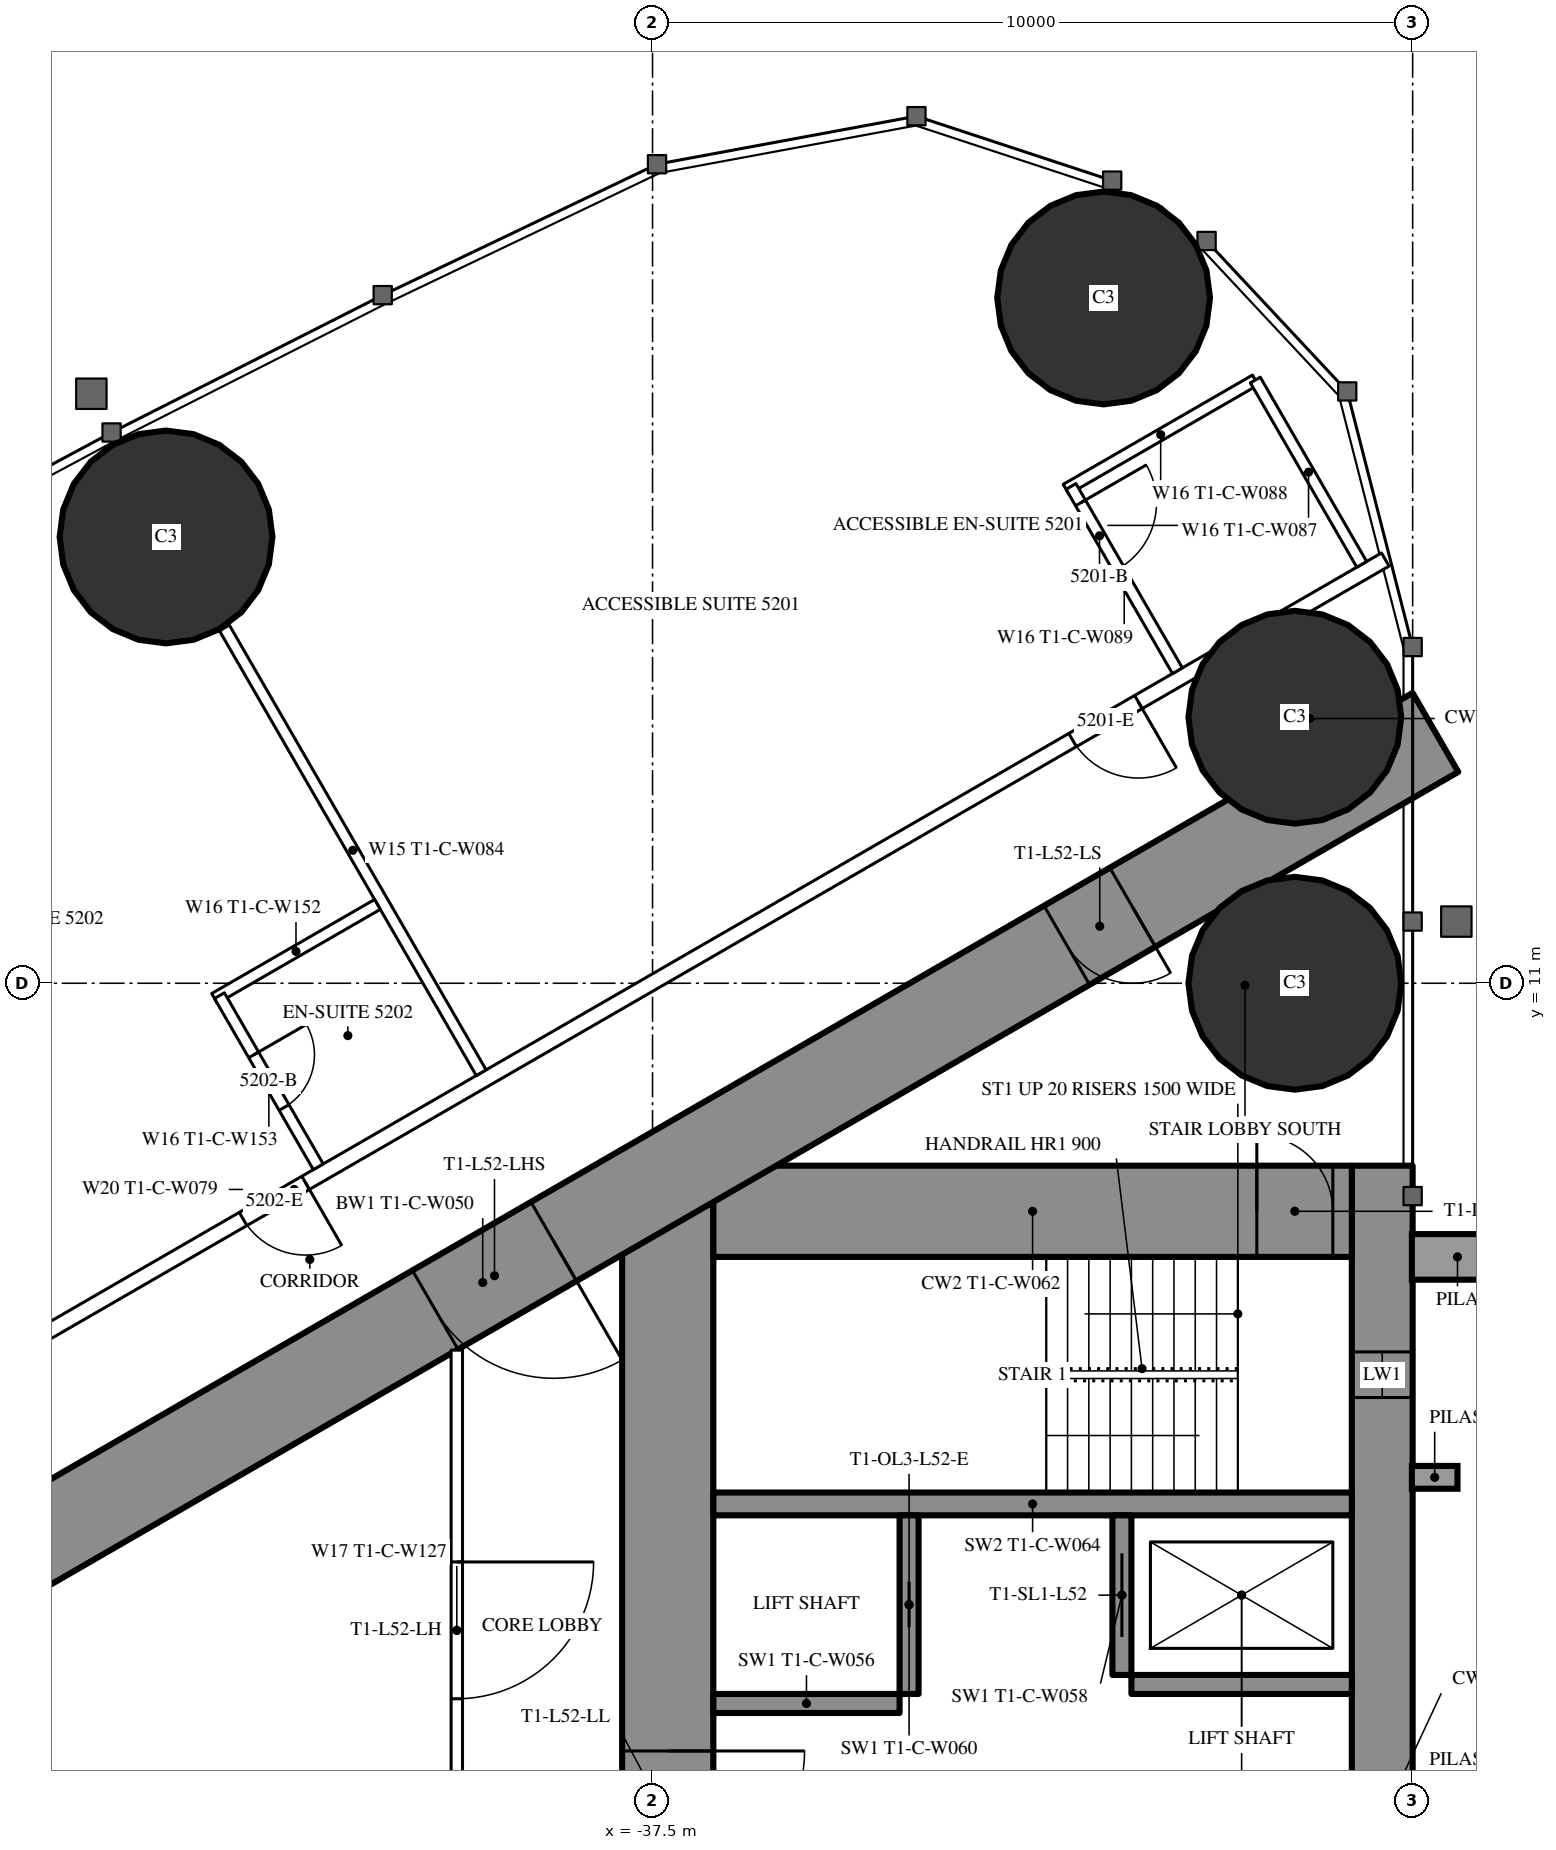
"""IFC4 building model, lengths in metres.
Left out: names, types, materials, properties, quantities, classifications, styles, units other than length and angle.
Written with IfcOpenShell. Run it as: python <this file> out.ifc"""

import sys

from ifc_helpers import new_model, si_unit, direction, frame, frame_2d, origin, origin_2d, place, context, subcontext, project, spatial, rectangle, circle, extrude, element, fill, save


model = new_model("IFC4")
c1 = context("Model", 3, precision=1e-05, world=origin(), true_north=direction((0.0, 1.0)))
c2 = subcontext(c1, "Body", "Model", "MODEL_VIEW")
j1 = project(units=[si_unit("LENGTHUNIT", "METRE"), si_unit("PLANEANGLEUNIT", "RADIAN")], contexts=[c1])
p1 = place(None, origin())
s1 = spatial("IfcSite", under=j1, at=p1, CompositionType="ELEMENT")
p2 = place(p1, origin())
s2 = spatial("IfcBuilding", under=s1, at=p2, CompositionType="ELEMENT")
p3 = place(p2, frame((0.0, 0.0, 194.8)))
s3 = spatial("IfcBuildingStorey", under=s2, at=p3, CompositionType="ELEMENT", Elevation=194.8)
for number, where, z_axis, x_axis in (
    (1, (-31.565, 20.016, 0.0), (0.0, 0.0, 1.0), (1.0, 0.0, 0.0)),
    (2, (-29.05, 11.0, 0.0), (0.0, 0.0, 1.0), (1.0, 0.0, 0.0)),
    (3, (-29.05, 14.5, 0.0), (0.0, 0.0, 1.0), (1.0, 0.0, 0.0)),
    (4, (-43.9, 16.871, 0.0), (0.0, 0.0, 1.0), (1.0, 0.0, 0.0)),
):
    element("IfcColumn", number, at=place(p3, frame(where, z_axis=z_axis, x_axis=x_axis)), inside=s3, PredefinedType="COLUMN", context=c2, shape_type="SweptSolid", body=[
        extrude(circle(Radius=1.4, at=origin_2d()), origin(), (0.0, 0.0, 1.0), 3.5),
    ])
p4 = place(p3, frame((-27.9, 8.6, 0.0), z_axis=(0.0, 0.0, 1.0), x_axis=(0.0, -1.0, 0.0)))
e5 = element("IfcWall", 5, at=p4, inside=s3, PredefinedType="SHEAR", context=c2, shape_type="SweptSolid", body=[
    extrude(rectangle(XDim=17.2, YDim=0.8, at=frame_2d((8.6, 0.0))), origin(), (0.0, 0.0, 1.0), 3.5),
])
p5 = place(p4, frame((2.45, 0.0, 0.6)))
e6 = element("IfcOpeningElement", 6, at=p5, cuts=e5, PredefinedType="OPENING", context=c2, shape_type="SweptSolid", body=[
    extrude(rectangle(XDim=0.6, YDim=2.1, at=frame_2d((0.3, 1.05))), frame((0.0, 0.41, 0.0), z_axis=(0.0, -1.0, 0.0), x_axis=(1.0, 0.0, 0.0)), (0.0, 0.0, 1.0), 0.82),
])
p6 = place(p4, frame((14.15, 0.0, 0.6)))
e7 = element("IfcOpeningElement", 7, at=p6, cuts=e5, PredefinedType="OPENING", context=c2, shape_type="SweptSolid", body=[
    extrude(rectangle(XDim=0.6, YDim=2.1, at=frame_2d((0.3, 1.05))), frame((0.0, 0.41, 0.0), z_axis=(0.0, -1.0, 0.0), x_axis=(1.0, 0.0, 0.0)), (0.0, 0.0, 1.0), 0.82),
])
p7 = place(p3, frame((-37.3, 8.6, 0.0), z_axis=(0.0, 0.0, 1.0), x_axis=(0.0, -1.0, 0.0)))
e8 = element("IfcWall", 8, at=p7, inside=s3, PredefinedType="SHEAR", context=c2, shape_type="SweptSolid", body=[
    extrude(rectangle(XDim=17.2, YDim=1.2, at=frame_2d((8.6, 0.0))), origin(), (0.0, 0.0, 1.0), 3.5),
])
p8 = place(p7, frame((7.7, 0.0, 0.0)))
e9 = element("IfcOpeningElement", 9, at=p8, cuts=e8, PredefinedType="OPENING", context=c2, shape_type="SweptSolid", body=[
    extrude(rectangle(XDim=1.8, YDim=2.2, at=frame_2d((0.9, 1.1))), frame((0.0, 0.61, 0.0), z_axis=(0.0, -1.0, 0.0), x_axis=(1.0, 0.0, 0.0)), (0.0, 0.0, 1.0), 1.22),
])
p9 = place(p3, frame((-28.3, 8.0, 0.0), z_axis=(0.0, 0.0, 1.0), x_axis=(-1.0, 0.0, 0.0)))
e10 = element("IfcWall", 10, at=p9, inside=s3, PredefinedType="SHEAR", context=c2, shape_type="SweptSolid", body=[
    extrude(rectangle(XDim=8.4, YDim=1.2, at=frame_2d((4.2, 0.0))), origin(), (0.0, 0.0, 1.0), 3.5),
])
p10 = place(p9, frame((0.25, 0.0, 0.0)))
e11 = element("IfcOpeningElement", 11, at=p10, cuts=e10, PredefinedType="OPENING", context=c2, shape_type="SweptSolid", body=[
    extrude(rectangle(XDim=1.0, YDim=2.2, at=frame_2d((0.5, 1.1))), frame((0.0, 0.61, 0.0), z_axis=(0.0, -1.0, 0.0), x_axis=(1.0, 0.0, 0.0)), (0.0, 0.0, 1.0), 1.22),
])
p11 = place(p3, frame((-28.3, 4.15, 0.0), z_axis=(0.0, 0.0, 1.0), x_axis=(-1.0, 0.0, 0.0)))
e12 = element("IfcWall", 12, at=p11, inside=s3, PredefinedType="SHEAR", context=c2, shape_type="SweptSolid", body=[
    extrude(rectangle(XDim=8.4, YDim=0.3, at=frame_2d((4.2, 0.0))), origin(), (0.0, 0.0, 1.0), 3.5),
])
p12 = place(p3, frame((-31.325, 4.0, 0.0), z_axis=(0.0, 0.0, 1.0), x_axis=(0.0, -1.0, 0.0)))
e13 = element("IfcWall", 13, at=p12, inside=s3, PredefinedType="SHEAR", context=c2, shape_type="SweptSolid", body=[
    extrude(rectangle(XDim=2.1, YDim=0.25, at=frame_2d((1.05, 0.0))), origin(), (0.0, 0.0, 1.0), 3.5),
])
p13 = place(p12, frame((0.5, 0.0, 0.0)))
e14 = element("IfcOpeningElement", 14, at=p13, cuts=e13, PredefinedType="OPENING", context=c2, shape_type="SweptSolid", body=[
    extrude(rectangle(XDim=1.1, YDim=2.2, at=frame_2d((0.55, 1.1))), frame((0.0, 0.135, 0.0), z_axis=(0.0, -1.0, 0.0), x_axis=(1.0, 0.0, 0.0)), (0.0, 0.0, 1.0), 0.27),
])
p14 = place(p3, frame((-34.125, 4.0, 0.0), z_axis=(0.0, 0.0, 1.0), x_axis=(0.0, -1.0, 0.0)))
e15 = element("IfcWall", 15, at=p14, inside=s3, PredefinedType="SHEAR", context=c2, shape_type="SweptSolid", body=[
    extrude(rectangle(XDim=2.35, YDim=0.25, at=frame_2d((1.175, 0.0))), origin(), (0.0, 0.0, 1.0), 3.5),
])
p15 = place(p14, frame((0.875, 0.0, 0.0)))
e16 = element("IfcOpeningElement", 16, at=p15, cuts=e15, PredefinedType="OPENING", context=c2, shape_type="SweptSolid", body=[
    extrude(rectangle(XDim=0.6, YDim=2.0, at=frame_2d((0.3, 1.0))), frame((0.0, 0.135, 0.0), z_axis=(0.0, -1.0, 0.0), x_axis=(1.0, 0.0, 0.0)), (0.0, 0.0, 1.0), 0.27),
])
p16 = place(p3, frame((-28.3, 1.775, 0.0), z_axis=(0.0, 0.0, 1.0), x_axis=(-1.0, 0.0, 0.0)))
e17 = element("IfcWall", 17, at=p16, inside=s3, PredefinedType="SHEAR", context=c2, shape_type="SweptSolid", body=[
    extrude(rectangle(XDim=2.9, YDim=0.25, at=frame_2d((1.45, 0.0))), origin(), (0.0, 0.0, 1.0), 3.5),
])
p17 = place(p3, frame((-34.25, 1.525, 0.0), z_axis=(0.0, 0.0, 1.0), x_axis=(-1.0, 0.0, 0.0)))
e18 = element("IfcWall", 18, at=p17, inside=s3, PredefinedType="SHEAR", context=c2, shape_type="SweptSolid", body=[
    extrude(rectangle(XDim=2.45, YDim=0.25, at=frame_2d((1.225, 0.0))), origin(), (0.0, 0.0, 1.0), 3.5),
])
p18 = place(p3, frame((-27.2, 14.3, 0.0), z_axis=(0.0, 0.0, 1.0), x_axis=(-0.866026593062, -0.499997940104, 0.0)))
e19 = element("IfcWall", 19, at=p18, inside=s3, PredefinedType="SHEAR", context=c2, shape_type="SweptSolid", body=[
    extrude(rectangle(XDim=28.946, YDim=1.2, at=frame_2d((14.473, 0.0))), origin(), (0.0, 0.0, 1.0), 3.5),
])
p19 = place(p18, frame((4.6, 0.0, 0.0)))
e20 = element("IfcOpeningElement", 20, at=p19, cuts=e19, PredefinedType="OPENING", context=c2, shape_type="SweptSolid", body=[
    extrude(rectangle(XDim=1.0, YDim=2.2, at=frame_2d((0.5, 1.1))), frame((0.0, 0.61, 0.0), z_axis=(0.0, -1.0, 0.0), x_axis=(1.0, 0.0, 0.0)), (0.0, 0.0, 1.0), 1.22),
])
p20 = place(p18, frame((13.395, 0.0, 0.0)))
e21 = element("IfcOpeningElement", 21, at=p20, cuts=e19, PredefinedType="OPENING", context=c2, shape_type="SweptSolid", body=[
    extrude(rectangle(XDim=1.8, YDim=2.2, at=frame_2d((0.9, 1.1))), frame((0.0, 0.61, 0.0), z_axis=(0.0, -1.0, 0.0), x_axis=(1.0, 0.0, 0.0)), (0.0, 0.0, 1.0), 1.22),
])
p21 = place(p3, frame((-27.86, 16.575, 0.0), z_axis=(0.0, 0.0, 1.0), x_axis=(-0.866025533911, -0.499999774615, 0.0)))
e22 = element("IfcWall", 22, at=p21, inside=s3, PredefinedType="PARTITIONING", context=c2, shape_type="SweptSolid", body=[
    extrude(rectangle(XDim=33.149, YDim=0.2, at=frame_2d((16.575, 0.0))), origin(), (0.0, 0.0, 1.0), 3.25),
])
p22 = place(p21, frame((3.75, 0.0, 0.0)))
e23 = element("IfcOpeningElement", 23, at=p22, cuts=e22, PredefinedType="OPENING", context=c2, shape_type="SweptSolid", body=[
    extrude(rectangle(XDim=1.0, YDim=2.2, at=frame_2d((0.5, 1.1))), frame((0.0, 0.11, 0.0), z_axis=(0.0, -1.0, 0.0), x_axis=(1.0, 0.0, 0.0)), (0.0, 0.0, 1.0), 0.22),
])
p23 = place(p21, frame((16.402, 0.0, 0.0)))
e24 = element("IfcOpeningElement", 24, at=p23, cuts=e22, PredefinedType="OPENING", context=c2, shape_type="SweptSolid", body=[
    extrude(rectangle(XDim=0.95, YDim=2.2, at=frame_2d((0.475, 1.1))), frame((0.0, 0.11, 0.0), z_axis=(0.0, -1.0, 0.0), x_axis=(1.0, 0.0, 0.0)), (0.0, 0.0, 1.0), 0.22),
])
p24 = place(p21, frame((22.047, 0.0, 0.0)))
e25 = element("IfcOpeningElement", 25, at=p24, cuts=e22, PredefinedType="OPENING", context=c2, shape_type="SweptSolid", body=[
    extrude(rectangle(XDim=0.95, YDim=2.2, at=frame_2d((0.475, 1.1))), frame((0.0, 0.11, 0.0), z_axis=(0.0, -1.0, 0.0), x_axis=(1.0, 0.0, 0.0)), (0.0, 0.0, 1.0), 0.22),
])
p25 = place(p21, frame((30.396, 0.0, 0.0)))
e26 = element("IfcOpeningElement", 26, at=p25, cuts=e22, PredefinedType="OPENING", context=c2, shape_type="SweptSolid", body=[
    extrude(rectangle(XDim=1.8, YDim=2.2, at=frame_2d((0.9, 1.1))), frame((0.0, 0.11, 0.0), z_axis=(0.0, -1.0, 0.0), x_axis=(1.0, 0.0, 0.0)), (0.0, 0.0, 1.0), 0.22),
])
p26 = place(p3, frame((-39.754, 9.823, 0.0), z_axis=(0.0, 0.0, 1.0), x_axis=(-0.499997670926, 0.866026748472, 0.0)))
e27 = element("IfcWall", 27, at=p26, inside=s3, PredefinedType="PARTITIONING", context=c2, shape_type="SweptSolid", body=[
    extrude(rectangle(XDim=6.757, YDim=0.15, at=frame_2d((3.379, 0.0))), origin(), (0.0, 0.0, 1.0), 2.3),
])
p27 = place(p3, frame((-29.57, 18.936, 0.0), z_axis=(0.0, 0.0, 1.0), x_axis=(-0.866018712932, -0.500011588718, 0.0)))
e28 = element("IfcWall", 28, at=p27, inside=s3, PredefinedType="PARTITIONING", context=c2, shape_type="SweptSolid", body=[
    extrude(rectangle(XDim=2.875, YDim=0.15, at=frame_2d((1.438, 0.0))), origin(), (0.0, 0.0, 1.0), 3.25),
])
p28 = place(p3, frame((-30.595, 15.111, 0.0), z_axis=(0.0, 0.0, 1.0), x_axis=(-0.49998411664, 0.866034573852, 0.0)))
e29 = element("IfcWall", 29, at=p28, inside=s3, PredefinedType="PARTITIONING", context=c2, shape_type="SweptSolid", body=[
    extrude(rectangle(XDim=2.8, YDim=0.15, at=frame_2d((1.4, 0.0))), origin(), (0.0, 0.0, 1.0), 3.25),
])
p29 = place(p28, frame((1.55, 0.0, 0.0)))
e30 = element("IfcOpeningElement", 30, at=p29, cuts=e29, PredefinedType="OPENING", context=c2, shape_type="SweptSolid", body=[
    extrude(rectangle(XDim=1.0, YDim=2.2, at=frame_2d((0.5, 1.1))), frame((0.0, 0.085, 0.0), z_axis=(0.0, -1.0, 0.0), x_axis=(1.0, 0.0, 0.0)), (0.0, 0.0, 1.0), 0.17),
])
p30 = place(p3, frame((-28.17, 16.511, 0.0), z_axis=(0.0, 0.0, 1.0), x_axis=(-0.49994636267, 0.866056369097, 0.0)))
e31 = element("IfcWall", 31, at=p30, inside=s3, PredefinedType="PARTITIONING", context=c2, shape_type="SweptSolid", body=[
    extrude(rectangle(XDim=2.8, YDim=0.15, at=frame_2d((1.4, 0.0))), origin(), (0.0, 0.0, 1.0), 3.25),
])
p31 = place(p3, frame((-41.119, 12.037, 0.0), z_axis=(0.0, 0.0, 1.0), x_axis=(-0.866073894602, -0.499916002032, 0.0)))
e32 = element("IfcWall", 32, at=p31, inside=s3, PredefinedType="PARTITIONING", context=c2, shape_type="SweptSolid", body=[
    extrude(rectangle(XDim=2.475, YDim=0.15, at=frame_2d((1.238, 0.0))), origin(), (0.0, 0.0, 1.0), 3.25),
])
p32 = place(p3, frame((-41.898, 8.585, 0.0), z_axis=(0.0, 0.0, 1.0), x_axis=(-0.500006934395, 0.866021400173, 0.0)))
e33 = element("IfcWall", 33, at=p32, inside=s3, PredefinedType="PARTITIONING", context=c2, shape_type="SweptSolid", body=[
    extrude(rectangle(XDim=2.6, YDim=0.15, at=frame_2d((1.3, 0.0))), origin(), (0.0, 0.0, 1.0), 3.25),
])
p33 = place(p32, frame((0.9, 0.0, 0.0)))
e34 = element("IfcOpeningElement", 34, at=p33, cuts=e33, PredefinedType="OPENING", context=c2, shape_type="SweptSolid", body=[
    extrude(rectangle(XDim=0.8, YDim=2.2, at=frame_2d((0.4, 1.1))), frame((0.0, 0.085, 0.0), z_axis=(0.0, -1.0, 0.0), x_axis=(1.0, 0.0, 0.0)), (0.0, 0.0, 1.0), 0.17),
])
p34 = place(p3, frame((-40.075, 6.174, 0.0), z_axis=(0.0, 0.0, 1.0), x_axis=(0.0, -1.0, 0.0)))
e35 = element("IfcWall", 35, at=p34, inside=s3, PredefinedType="PARTITIONING", context=c2, shape_type="SweptSolid", body=[
    extrude(rectangle(XDim=7.374, YDim=0.15, at=frame_2d((3.687, 0.0))), origin(), (0.0, 0.0, 1.0), 3.25),
])
p35 = place(p34, frame((2.787, 0.0, 0.0)))
e36 = element("IfcOpeningElement", 36, at=p35, cuts=e35, PredefinedType="OPENING", context=c2, shape_type="SweptSolid", body=[
    extrude(rectangle(XDim=1.8, YDim=2.2, at=frame_2d((0.9, 1.1))), frame((0.0, 0.085, 0.0), z_axis=(0.0, -1.0, 0.0), x_axis=(1.0, 0.0, 0.0)), (0.0, 0.0, 1.0), 0.17),
])
p36 = place(p29, origin())
e37 = element("IfcDoor", 37, at=p36, inside=s3, OperationType="SINGLE_SWING_RIGHT", PredefinedType="DOOR", context=c2, shape_type="SweptSolid", body=[
    extrude(rectangle(XDim=1.0, YDim=2.2, at=frame_2d((0.5, 1.1))), frame((0.0, 0.025, 0.0), z_axis=(0.0, -1.0, 0.0), x_axis=(1.0, 0.0, 0.0)), (0.0, 0.0, 1.0), 0.05),
])
fill(e30, e37)
p37 = place(p22, origin())
e38 = element("IfcDoor", 38, at=p37, inside=s3, OperationType="SINGLE_SWING_LEFT", PredefinedType="DOOR", context=c2, shape_type="SweptSolid", body=[
    extrude(rectangle(XDim=1.0, YDim=2.2, at=frame_2d((0.5, 1.1))), frame((0.0, 0.025, 0.0), z_axis=(0.0, -1.0, 0.0), x_axis=(1.0, 0.0, 0.0)), (0.0, 0.0, 1.0), 0.05),
])
fill(e23, e38)
p38 = place(p33, origin())
e39 = element("IfcDoor", 39, at=p38, inside=s3, OperationType="SINGLE_SWING_RIGHT", PredefinedType="DOOR", context=c2, shape_type="SweptSolid", body=[
    extrude(rectangle(XDim=0.8, YDim=2.2, at=frame_2d((0.4, 1.1))), frame((0.0, 0.025, 0.0), z_axis=(0.0, -1.0, 0.0), x_axis=(1.0, 0.0, 0.0)), (0.0, 0.0, 1.0), 0.05),
])
fill(e34, e39)
p39 = place(p23, origin())
e40 = element("IfcDoor", 40, at=p39, inside=s3, OperationType="SINGLE_SWING_LEFT", PredefinedType="DOOR", context=c2, shape_type="SweptSolid", body=[
    extrude(rectangle(XDim=0.95, YDim=2.2, at=frame_2d((0.475, 1.1))), frame((0.0, 0.025, 0.0), z_axis=(0.0, -1.0, 0.0), x_axis=(1.0, 0.0, 0.0)), (0.0, 0.0, 1.0), 0.05),
])
fill(e24, e40)
p40 = place(p35, origin())
e41 = element("IfcDoor", 41, at=p40, inside=s3, OperationType="DOUBLE_DOOR_SINGLE_SWING", PredefinedType="DOOR", context=c2, shape_type="SweptSolid", body=[
    extrude(rectangle(XDim=1.8, YDim=2.2, at=frame_2d((0.9, 1.1))), frame((0.0, 0.025, 0.0), z_axis=(0.0, -1.0, 0.0), x_axis=(1.0, 0.0, 0.0)), (0.0, 0.0, 1.0), 0.05),
])
fill(e36, e41)
p41 = place(p19, origin())
e42 = element("IfcDoor", 42, at=p41, inside=s3, OperationType="SINGLE_SWING_LEFT", PredefinedType="DOOR", context=c2, shape_type="SweptSolid", body=[
    extrude(rectangle(XDim=1.0, YDim=2.2, at=frame_2d((0.5, 1.1))), frame((0.0, 0.025, 0.0), z_axis=(0.0, -1.0, 0.0), x_axis=(1.0, 0.0, 0.0)), (0.0, 0.0, 1.0), 0.05),
])
fill(e20, e42)
p42 = place(p20, origin())
e43 = element("IfcDoor", 43, at=p42, inside=s3, OperationType="DOUBLE_DOOR_SINGLE_SWING", PredefinedType="DOOR", context=c2, shape_type="SweptSolid", body=[
    extrude(rectangle(XDim=1.8, YDim=2.2, at=frame_2d((0.9, 1.1))), frame((0.0, 0.025, 0.0), z_axis=(0.0, -1.0, 0.0), x_axis=(1.0, 0.0, 0.0)), (0.0, 0.0, 1.0), 0.05),
])
fill(e21, e43)
p43 = place(p8, origin())
e44 = element("IfcDoor", 44, at=p43, inside=s3, OperationType="DOUBLE_DOOR_SINGLE_SWING", PredefinedType="DOOR", context=c2, shape_type="SweptSolid", body=[
    extrude(rectangle(XDim=1.8, YDim=2.2, at=frame_2d((0.9, 1.1))), frame((0.0, 0.025, 0.0), z_axis=(0.0, -1.0, 0.0), x_axis=(1.0, 0.0, 0.0)), (0.0, 0.0, 1.0), 0.05),
])
fill(e9, e44)
p44 = place(p10, origin())
e45 = element("IfcDoor", 45, at=p44, inside=s3, OperationType="SINGLE_SWING_RIGHT", PredefinedType="DOOR", context=c2, shape_type="SweptSolid", body=[
    extrude(rectangle(XDim=1.0, YDim=2.2, at=frame_2d((0.5, 1.1))), frame((0.0, 0.025, 0.0), z_axis=(0.0, -1.0, 0.0), x_axis=(1.0, 0.0, 0.0)), (0.0, 0.0, 1.0), 0.05),
])
fill(e11, e45)
p45 = place(p13, origin())
e46 = element("IfcDoor", 46, at=p45, inside=s3, OperationType="SLIDING_TO_LEFT", PredefinedType="USERDEFINED", context=c2, shape_type="SweptSolid", body=[
    extrude(rectangle(XDim=1.1, YDim=2.2, at=frame_2d((0.55, 1.1))), frame((0.0, 0.025, 0.0), z_axis=(0.0, -1.0, 0.0), x_axis=(1.0, 0.0, 0.0)), (0.0, 0.0, 1.0), 0.05),
])
fill(e14, e46)
p46 = place(p15, origin())
e47 = element("IfcDoor", 47, at=p46, inside=s3, OperationType="SLIDING_TO_LEFT", PredefinedType="DOOR", context=c2, shape_type="SweptSolid", body=[
    extrude(rectangle(XDim=0.6, YDim=2.0, at=frame_2d((0.3, 1.0))), frame((0.0, 0.025, 0.0), z_axis=(0.0, -1.0, 0.0), x_axis=(1.0, 0.0, 0.0)), (0.0, 0.0, 1.0), 0.05),
])
fill(e16, e47)
p47 = place(p5, origin())
e48 = element("IfcWindow", 48, at=p47, inside=s3, PartitioningType="SINGLE_PANEL", PredefinedType="WINDOW", context=c2, shape_type="SweptSolid", body=[
    extrude(rectangle(XDim=0.6, YDim=2.1, at=frame_2d((0.3, 1.05))), frame((0.0, 0.03, 0.0), z_axis=(0.0, -1.0, 0.0), x_axis=(1.0, 0.0, 0.0)), (0.0, 0.0, 1.0), 0.06),
])
fill(e6, e48)
save(model, sys.argv[1])
